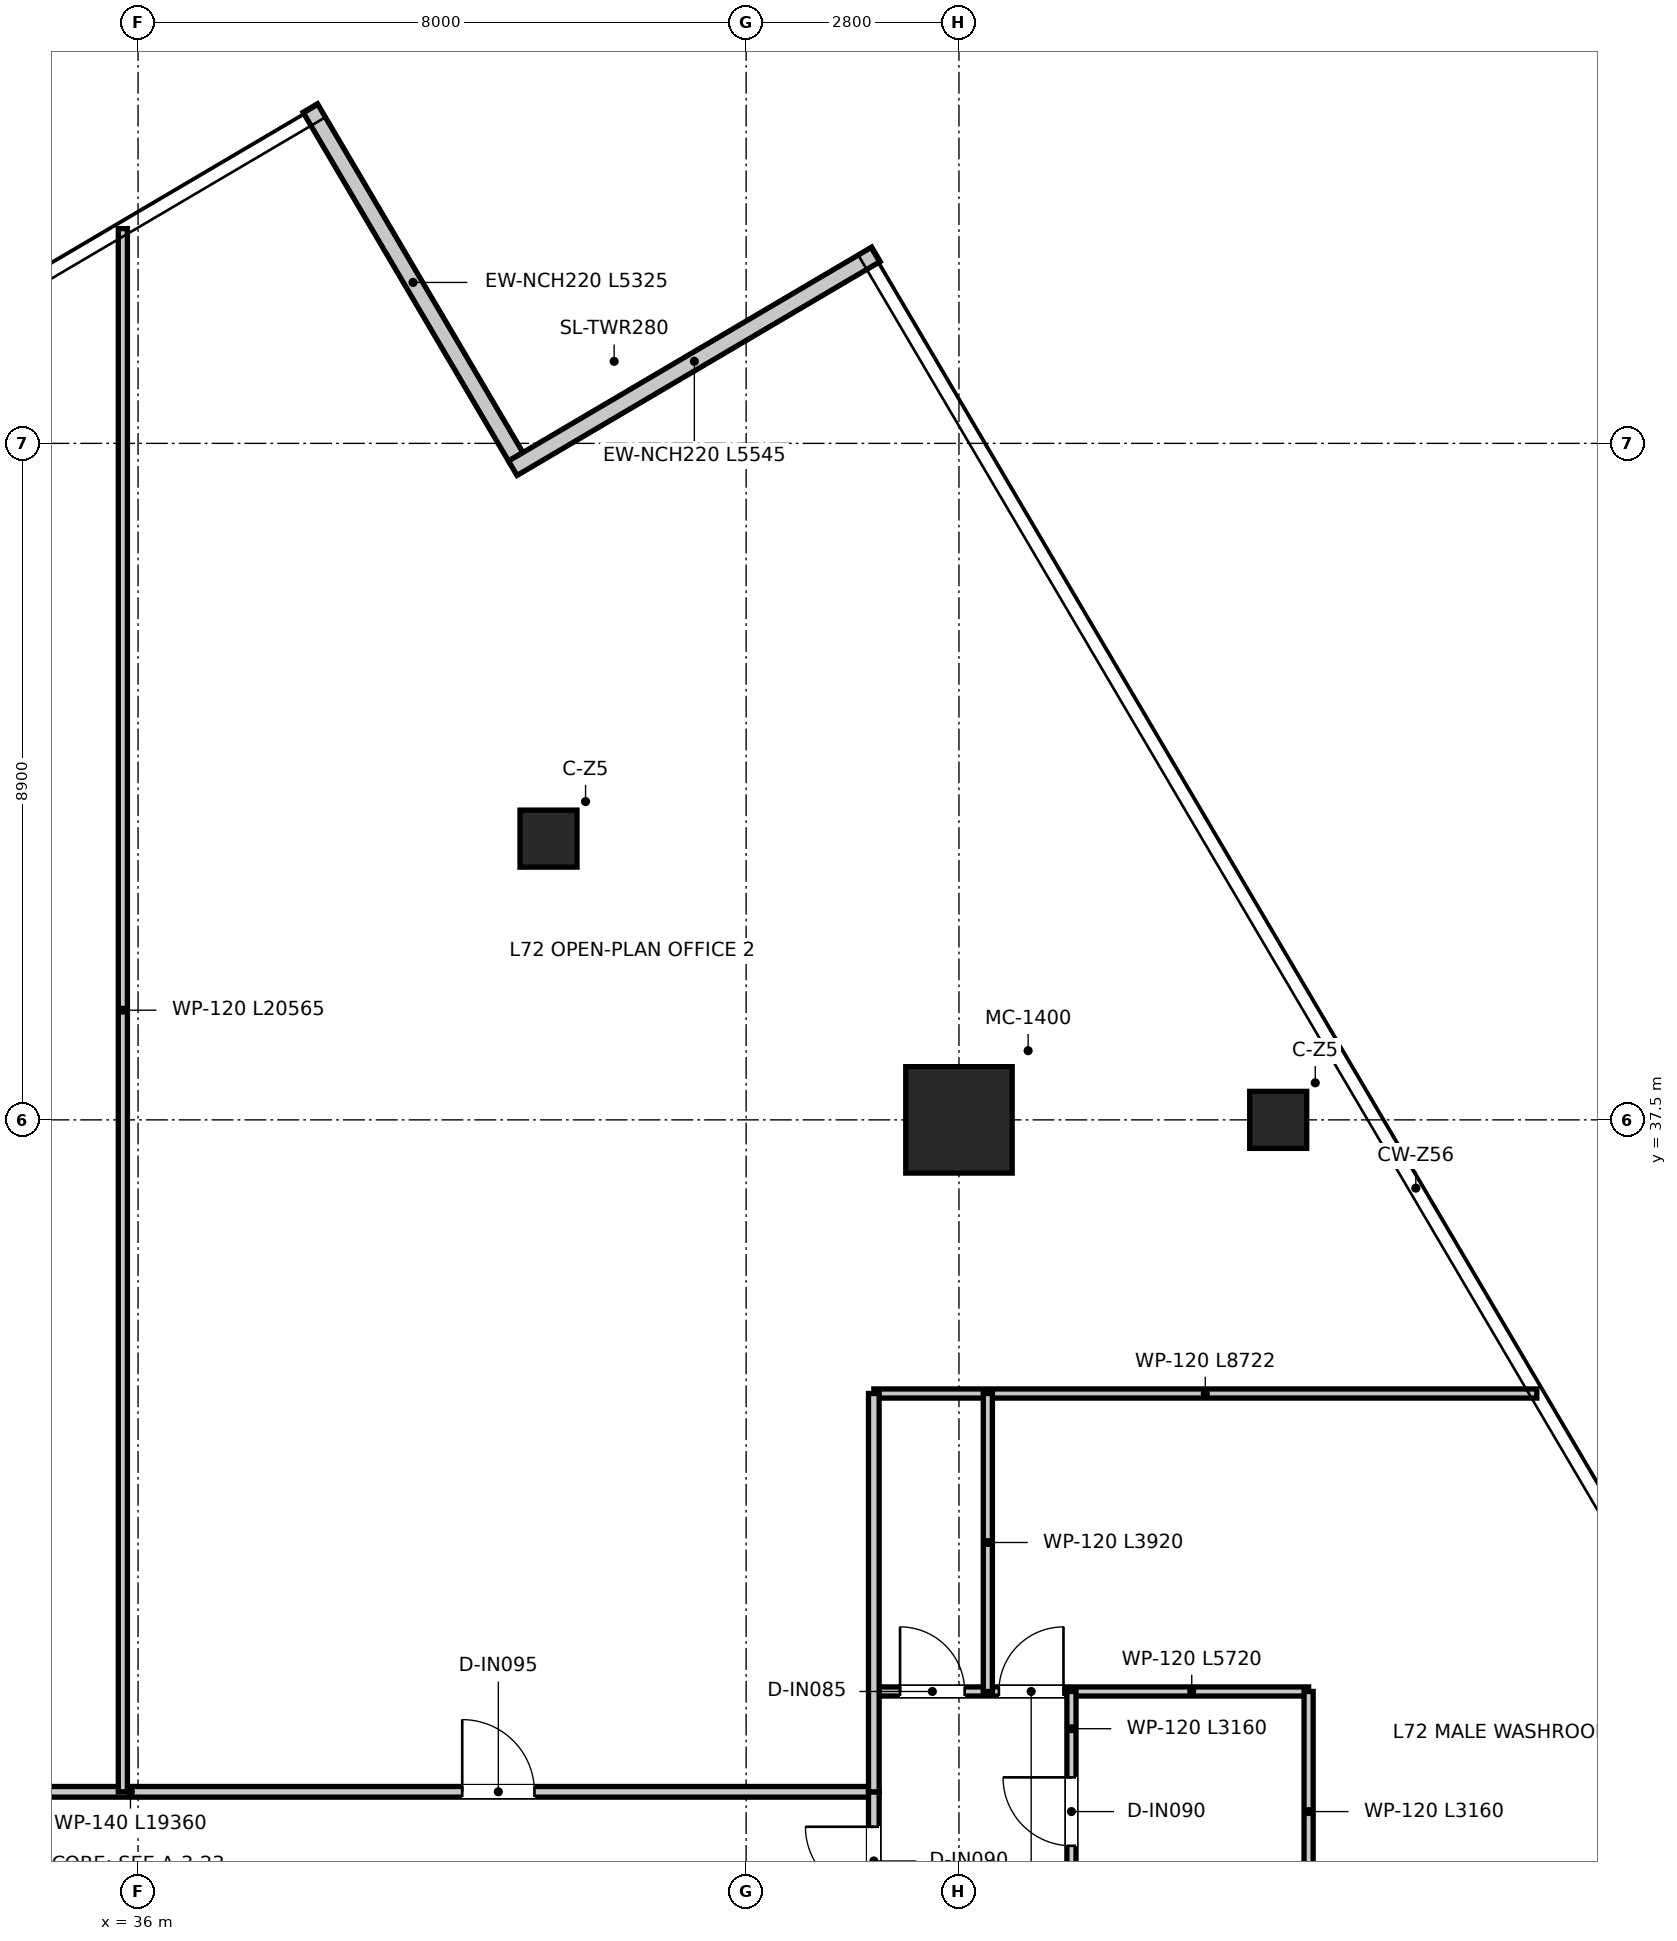
"""IFC4 building model, lengths in metres.
Left out: names, types, materials, properties, quantities, classifications, styles, units other than length and angle.
Written with IfcOpenShell. Run it as: python <this file> out.ifc"""

import sys

from ifc_helpers import new_model, si_unit, direction, frame, frame_2d, origin, origin_2d, place, context, subcontext, project, spatial, rectangle, extrude, source, transform, mapped, element, fill, save


model = new_model("IFC4")
c1 = context("Model", 3, precision=1e-05, world=origin(), true_north=direction((0.0, 1.0)))
c2 = subcontext(c1, "Body", "Model", "MODEL_VIEW")
j1 = project(units=[si_unit("LENGTHUNIT", "METRE"), si_unit("PLANEANGLEUNIT", "RADIAN")], contexts=[c1])
p1 = place(None, origin())
s1 = spatial("IfcSite", under=j1, at=p1, CompositionType="ELEMENT")
p2 = place(p1, origin())
s2 = spatial("IfcBuilding", under=s1, at=p2, CompositionType="ELEMENT")
p3 = place(p2, frame((0.0, 0.0, 295.05)))
s3 = spatial("IfcBuildingStorey", under=s2, at=p3, CompositionType="ELEMENT", Elevation=295.05)
m1 = source(origin(), c2, "Body", "SweptSolid", [
    extrude(rectangle(XDim=1.4, YDim=1.4, at=origin_2d()), origin(), (0.0, 0.0, 1.0), 3.95),
])
p4 = place(p3, frame((46.8, 37.5, 0.0), z_axis=(0.0, 0.0, 1.0), x_axis=(1.0, 0.0, 0.0)))
e1 = element("IfcColumn", 1, at=p4, inside=s3, PredefinedType="USERDEFINED", context=c2, shape_type="MappedRepresentation", body=[
    mapped(m1, transform((0.0, 0.0, 0.0), x_axis=(1.0, 0.0, 0.0), y_axis=(0.0, 1.0, 0.0), z_axis=(0.0, 0.0, 1.0), scale=1.0)),
])
m2 = source(origin(), c2, "Body", "SweptSolid", [
    extrude(rectangle(XDim=0.75, YDim=0.75, at=origin_2d()), origin(), (0.0, 0.0, 1.0), 3.95),
])
for number, where, z_axis, x_axis in (
    (2, (41.4, 41.2, 0.0), (0.0, 0.0, 1.0), (1.0, 0.0, 0.0)),
    (3, (51.0, 37.5, 0.0), (0.0, 0.0, 1.0), (1.0, 0.0, 0.0)),
):
    element("IfcColumn", number, at=place(p3, frame(where, z_axis=z_axis, x_axis=x_axis)), inside=s3, PredefinedType="COLUMN", context=c2, shape_type="MappedRepresentation", body=[
        mapped(m2, transform((0.0, 0.0, 0.0), x_axis=(1.0, 0.0, 0.0), y_axis=(0.0, 1.0, 0.0), z_axis=(0.0, 0.0, 1.0), scale=1.0)),
    ])
p5 = place(p3, frame((40.969, 46.223, 0.0), z_axis=(0.0, 0.0, 1.0), x_axis=(-0.507540984104, 0.861627616465, 0.0)))
e4 = element("IfcWall", 4, at=p5, inside=s3, PredefinedType="ELEMENTEDWALL", context=c2, shape_type="SweptSolid", body=[
    extrude(rectangle(XDim=5.325, YDim=0.22, at=frame_2d((2.663, 0.0))), origin(), (0.0, 0.0, 1.0), 3.67),
])
p6 = place(p3, frame((45.708, 48.887, 0.0), z_axis=(0.0, 0.0, 1.0), x_axis=(-0.861640923955, -0.507518391948, 0.0)))
e5 = element("IfcWall", 5, at=p6, inside=s3, PredefinedType="ELEMENTEDWALL", context=c2, shape_type="SweptSolid", body=[
    extrude(rectangle(XDim=5.545, YDim=0.22, at=frame_2d((2.772, 0.0))), origin(), (0.0, 0.0, 1.0), 3.67),
])
p7 = place(p3, frame((26.32, 28.66, 0.0), z_axis=(0.0, 0.0, 1.0), x_axis=(1.0, 0.0, 0.0)))
e6 = element("IfcWall", 6, at=p7, inside=s3, PredefinedType="PARTITIONING", context=c2, shape_type="SweptSolid", body=[
    extrude(rectangle(XDim=19.36, YDim=0.14, at=frame_2d((9.68, 0.0))), origin(), (0.0, 0.0, 1.0), 3.18),
])
p8 = place(p7, frame((4.265, 0.0, 0.0)))
e7 = element("IfcOpeningElement", 7, at=p8, cuts=e6, PredefinedType="OPENING", context=c2, shape_type="SweptSolid", body=[
    extrude(rectangle(XDim=0.95, YDim=2.1, at=frame_2d((0.475, 1.05))), frame((0.0, 0.08, 0.0), z_axis=(0.0, -1.0, 0.0), x_axis=(1.0, 0.0, 0.0)), (0.0, 0.0, 1.0), 0.16),
])
p9 = place(p7, frame((13.945, 0.0, 0.0)))
e8 = element("IfcOpeningElement", 8, at=p9, cuts=e6, PredefinedType="OPENING", context=c2, shape_type="SweptSolid", body=[
    extrude(rectangle(XDim=0.95, YDim=2.1, at=frame_2d((0.475, 1.05))), frame((0.0, 0.08, 0.0), z_axis=(0.0, -1.0, 0.0), x_axis=(1.0, 0.0, 0.0)), (0.0, 0.0, 1.0), 0.16),
])
p10 = place(p3, frame((45.68, 9.759, 0.0), z_axis=(0.0, 0.0, 1.0), x_axis=(0.0, 1.0, 0.0)))
e9 = element("IfcWall", 9, at=p10, inside=s3, PredefinedType="PARTITIONING", context=c2, shape_type="SweptSolid", body=[
    extrude(rectangle(XDim=18.901, YDim=0.14, at=frame_2d((9.451, 0.0))), origin(), (0.0, 0.0, 1.0), 3.13),
])
p11 = place(p10, frame((17.541, 0.0, 0.0)))
e10 = element("IfcOpeningElement", 10, at=p11, cuts=e9, PredefinedType="OPENING", context=c2, shape_type="SweptSolid", body=[
    extrude(rectangle(XDim=0.9, YDim=2.1, at=frame_2d((0.45, 1.05))), frame((0.0, 0.08, 0.0), z_axis=(0.0, -1.0, 0.0), x_axis=(1.0, 0.0, 0.0)), (0.0, 0.0, 1.0), 0.16),
])
p12 = place(p10, frame((9.291, 0.0, 0.0)))
e11 = element("IfcOpeningElement", 11, at=p12, cuts=e9, PredefinedType="OPENING", context=c2, shape_type="SweptSolid", body=[
    extrude(rectangle(XDim=0.9, YDim=2.1, at=frame_2d((0.45, 1.05))), frame((0.0, 0.08, 0.0), z_axis=(0.0, -1.0, 0.0), x_axis=(1.0, 0.0, 0.0)), (0.0, 0.0, 1.0), 0.16),
])
p13 = place(p10, frame((13.951, 0.0, 0.0)))
e12 = element("IfcOpeningElement", 12, at=p13, cuts=e9, PredefinedType="OPENING", context=c2, shape_type="SweptSolid", body=[
    extrude(rectangle(XDim=0.9, YDim=2.1, at=frame_2d((0.45, 1.05))), frame((0.0, 0.08, 0.0), z_axis=(0.0, -1.0, 0.0), x_axis=(1.0, 0.0, 0.0)), (0.0, 0.0, 1.0), 0.16),
])
p14 = place(p3, frame((45.68, 33.9, 0.0), z_axis=(0.0, 0.0, 1.0), x_axis=(1.0, 0.0, 0.0)))
e13 = element("IfcWall", 13, at=p14, inside=s3, PredefinedType="PARTITIONING", context=c2, shape_type="SweptSolid", body=[
    extrude(rectangle(XDim=8.722, YDim=0.12, at=frame_2d((4.361, 0.0))), origin(), (0.0, 0.0, 1.0), 3.13),
])
p15 = place(p3, frame((45.68, 29.98, 0.0), z_axis=(0.0, 0.0, 1.0), x_axis=(1.0, 0.0, 0.0)))
e14 = element("IfcWall", 14, at=p15, inside=s3, PredefinedType="PARTITIONING", context=c2, shape_type="SweptSolid", body=[
    extrude(rectangle(XDim=5.72, YDim=0.12, at=frame_2d((2.86, 0.0))), origin(), (0.0, 0.0, 1.0), 3.13),
])
p16 = place(p15, frame((1.645, 0.0, 0.0)))
e15 = element("IfcOpeningElement", 15, at=p16, cuts=e14, PredefinedType="OPENING", context=c2, shape_type="SweptSolid", body=[
    extrude(rectangle(XDim=0.85, YDim=2.1, at=frame_2d((0.425, 1.05))), frame((0.0, 0.07, 0.0), z_axis=(0.0, -1.0, 0.0), x_axis=(1.0, 0.0, 0.0)), (0.0, 0.0, 1.0), 0.14),
])
p17 = place(p15, frame((0.345, 0.0, 0.0)))
e16 = element("IfcOpeningElement", 16, at=p17, cuts=e14, PredefinedType="OPENING", context=c2, shape_type="SweptSolid", body=[
    extrude(rectangle(XDim=0.85, YDim=2.1, at=frame_2d((0.425, 1.05))), frame((0.0, 0.07, 0.0), z_axis=(0.0, -1.0, 0.0), x_axis=(1.0, 0.0, 0.0)), (0.0, 0.0, 1.0), 0.14),
])
p18 = place(p3, frame((51.4, 26.82, 0.0), z_axis=(0.0, 0.0, 1.0), x_axis=(0.0, 1.0, 0.0)))
e17 = element("IfcWall", 17, at=p18, inside=s3, PredefinedType="PARTITIONING", context=c2, shape_type="SweptSolid", body=[
    extrude(rectangle(XDim=3.16, YDim=0.12, at=frame_2d((1.58, 0.0))), origin(), (0.0, 0.0, 1.0), 3.67),
])
p19 = place(p3, frame((48.28, 26.82, 0.0), z_axis=(0.0, 0.0, 1.0), x_axis=(0.0, 1.0, 0.0)))
e18 = element("IfcWall", 18, at=p19, inside=s3, PredefinedType="PARTITIONING", context=c2, shape_type="SweptSolid", body=[
    extrude(rectangle(XDim=3.16, YDim=0.12, at=frame_2d((1.58, 0.0))), origin(), (0.0, 0.0, 1.0), 3.18),
])
p20 = place(p19, frame((1.13, 0.0, 0.0)))
e19 = element("IfcOpeningElement", 19, at=p20, cuts=e18, PredefinedType="OPENING", context=c2, shape_type="SweptSolid", body=[
    extrude(rectangle(XDim=0.9, YDim=2.1, at=frame_2d((0.45, 1.05))), frame((0.0, 0.07, 0.0), z_axis=(0.0, -1.0, 0.0), x_axis=(1.0, 0.0, 0.0)), (0.0, 0.0, 1.0), 0.14),
])
p21 = place(p3, frame((47.18, 29.98, 0.0), z_axis=(0.0, 0.0, 1.0), x_axis=(0.0, 1.0, 0.0)))
e20 = element("IfcWall", 20, at=p21, inside=s3, PredefinedType="PARTITIONING", context=c2, shape_type="SweptSolid", body=[
    extrude(rectangle(XDim=3.92, YDim=0.12, at=frame_2d((1.96, 0.0))), origin(), (0.0, 0.0, 1.0), 3.31),
])
p22 = place(p3, frame((45.68, 28.66, 0.0), z_axis=(0.0, 0.0, 1.0), x_axis=(0.0, 1.0, 0.0)))
e21 = element("IfcWall", 21, at=p22, inside=s3, PredefinedType="PARTITIONING", context=c2, shape_type="SweptSolid", body=[
    extrude(rectangle(XDim=5.24, YDim=0.14, at=frame_2d((2.62, 0.0))), origin(), (0.0, 0.0, 1.0), 3.43),
])
p23 = place(p3, frame((35.8, 28.66, 0.0), z_axis=(0.0, 0.0, 1.0), x_axis=(0.0, 1.0, 0.0)))
e22 = element("IfcWall", 22, at=p23, inside=s3, PredefinedType="PARTITIONING", context=c2, shape_type="SweptSolid", body=[
    extrude(rectangle(XDim=20.565, YDim=0.12, at=frame_2d((10.283, 0.0))), origin(), (0.0, 0.0, 1.0), 3.13),
])
p24 = place(p11, origin())
e23 = element("IfcDoor", 23, at=p24, inside=s3, OperationType="SINGLE_SWING_RIGHT", PredefinedType="DOOR", context=c2, shape_type="SweptSolid", body=[
    extrude(rectangle(XDim=0.9, YDim=2.1, at=frame_2d((0.45, 1.05))), frame((0.0, 0.025, 0.0), z_axis=(0.0, -1.0, 0.0), x_axis=(1.0, 0.0, 0.0)), (0.0, 0.0, 1.0), 0.05),
])
fill(e10, e23)
p25 = place(p16, origin())
e24 = element("IfcDoor", 24, at=p25, inside=s3, OperationType="SINGLE_SWING_RIGHT", PredefinedType="DOOR", context=c2, shape_type="SweptSolid", body=[
    extrude(rectangle(XDim=0.85, YDim=2.1, at=frame_2d((0.425, 1.05))), frame((0.0, 0.025, 0.0), z_axis=(0.0, -1.0, 0.0), x_axis=(1.0, 0.0, 0.0)), (0.0, 0.0, 1.0), 0.05),
])
fill(e15, e24)
p26 = place(p17, origin())
e25 = element("IfcDoor", 25, at=p26, inside=s3, OperationType="SINGLE_SWING_LEFT", PredefinedType="DOOR", context=c2, shape_type="SweptSolid", body=[
    extrude(rectangle(XDim=0.85, YDim=2.1, at=frame_2d((0.425, 1.05))), frame((0.0, 0.025, 0.0), z_axis=(0.0, -1.0, 0.0), x_axis=(1.0, 0.0, 0.0)), (0.0, 0.0, 1.0), 0.05),
])
fill(e16, e25)
p27 = place(p20, origin())
e26 = element("IfcDoor", 26, at=p27, inside=s3, OperationType="SINGLE_SWING_RIGHT", PredefinedType="DOOR", context=c2, shape_type="SweptSolid", body=[
    extrude(rectangle(XDim=0.9, YDim=2.1, at=frame_2d((0.45, 1.05))), frame((0.0, 0.025, 0.0), z_axis=(0.0, -1.0, 0.0), x_axis=(1.0, 0.0, 0.0)), (0.0, 0.0, 1.0), 0.05),
])
fill(e19, e26)
p28 = place(p9, origin())
e27 = element("IfcDoor", 27, at=p28, inside=s3, OperationType="SINGLE_SWING_LEFT", PredefinedType="DOOR", context=c2, shape_type="SweptSolid", body=[
    extrude(rectangle(XDim=0.95, YDim=2.1, at=frame_2d((0.475, 1.05))), frame((0.0, 0.025, 0.0), z_axis=(0.0, -1.0, 0.0), x_axis=(1.0, 0.0, 0.0)), (0.0, 0.0, 1.0), 0.05),
])
fill(e8, e27)
save(model, sys.argv[1])
